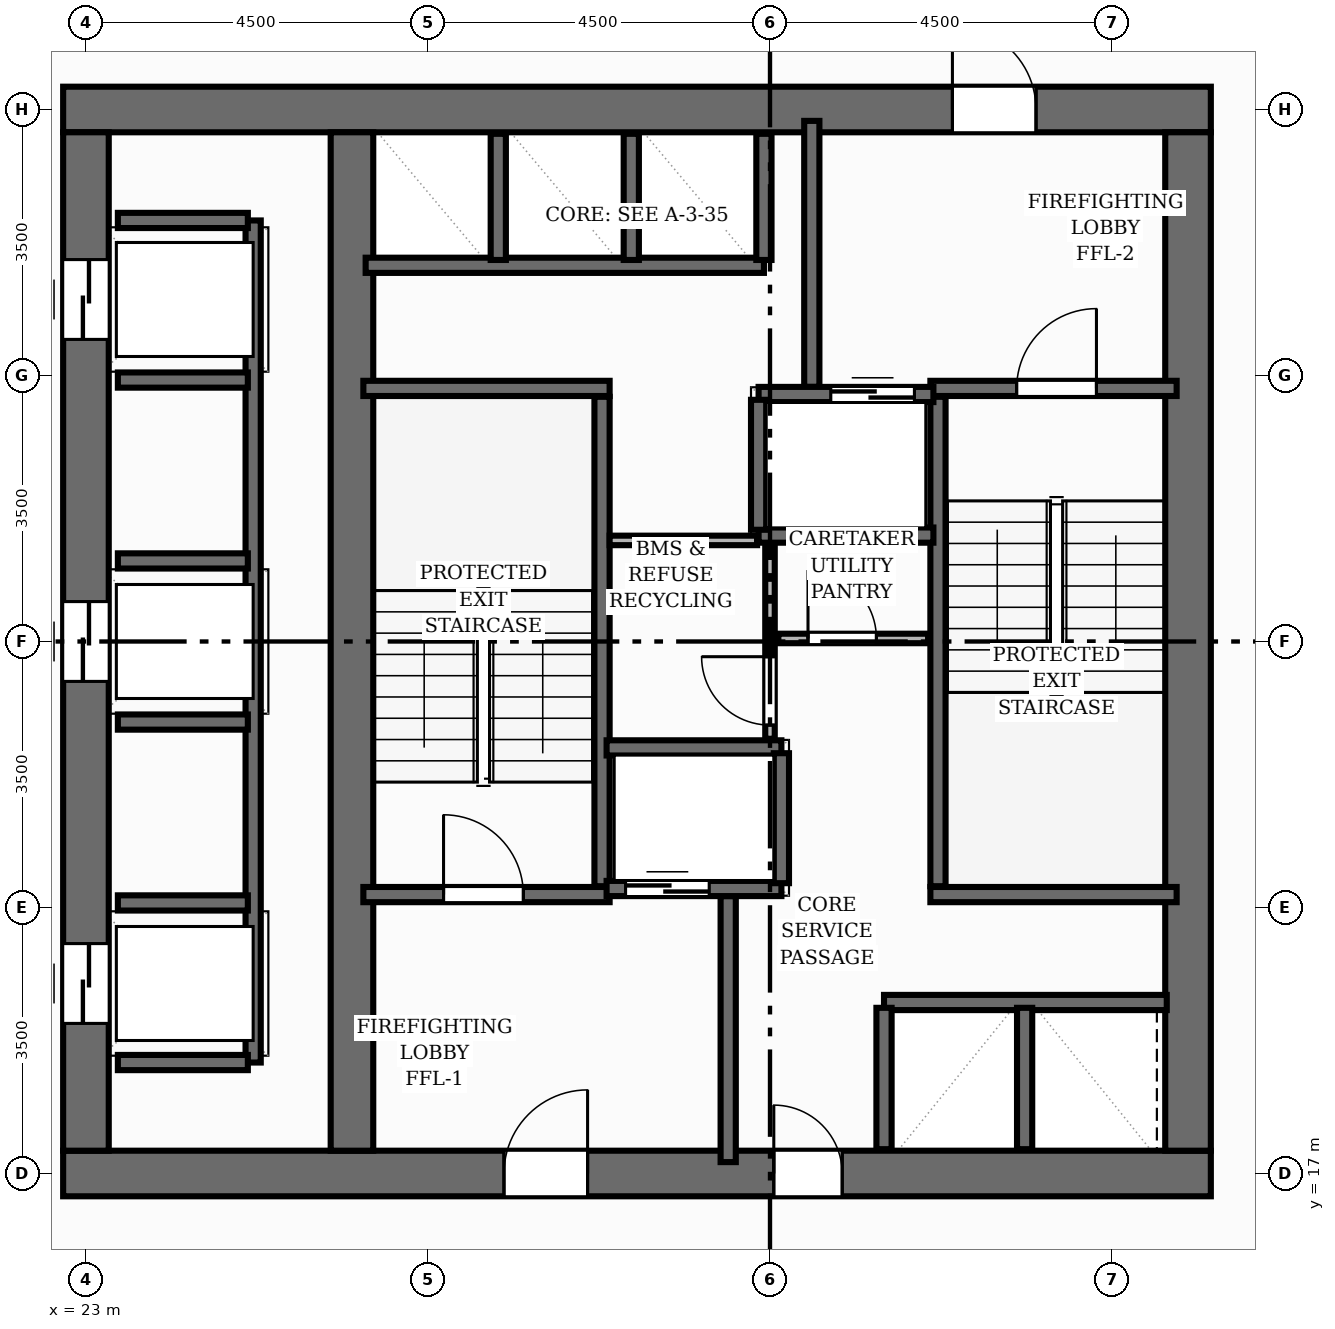
"""IFC4 building model, lengths in metres.
Left out: names, types, materials, properties, quantities, classifications, styles, units other than length and angle.
Written with IfcOpenShell. Run it as: python <this file> out.ifc"""

import sys

from ifc_helpers import new_model, si_unit, direction, frame, frame_2d, origin, place, context, subcontext, project, spatial, rectangle, extrude, element, fill, save


model = new_model("IFC4")
c1 = context("Model", 3, precision=1e-05, world=origin(), true_north=direction((0.0, 1.0)))
c2 = subcontext(c1, "Body", "Model", "MODEL_VIEW")
j1 = project(units=[si_unit("LENGTHUNIT", "METRE"), si_unit("PLANEANGLEUNIT", "RADIAN")], contexts=[c1])
p1 = place(None, origin())
s1 = spatial("IfcSite", under=j1, at=p1, CompositionType="ELEMENT")
p2 = place(p1, origin())
s2 = spatial("IfcBuilding", under=s1, at=p2, CompositionType="ELEMENT")
p3 = place(p2, frame((0.0, 0.0, 142.56)))
s3 = spatial("IfcBuildingStorey", under=s2, at=p3, CompositionType="ELEMENT", Elevation=142.56)
p4 = place(p3, frame((22.7, 17.0, 0.0), z_axis=(0.0, 0.0, 1.0), x_axis=(1.0, 0.0, 0.0)))
e1 = element("IfcWall", 1, at=p4, inside=s3, PredefinedType="SHEAR", context=c2, shape_type="SweptSolid", body=[
    extrude(rectangle(XDim=15.1, YDim=0.6, at=frame_2d((7.55, 0.0))), origin(), (0.0, 0.0, 1.0), 3.2),
])
p5 = place(p4, frame((5.8, 0.0, 0.0)))
e2 = element("IfcOpeningElement", 2, at=p5, cuts=e1, PredefinedType="OPENING", context=c2, shape_type="SweptSolid", body=[
    extrude(rectangle(XDim=1.1, YDim=2.15, at=frame_2d((0.55, 1.075))), frame((0.0, 0.31, 0.0), z_axis=(0.0, -1.0, 0.0), x_axis=(1.0, 0.0, 0.0)), (0.0, 0.0, 1.0), 0.62),
])
p6 = place(p4, frame((9.35, 0.0, 0.0)))
e3 = element("IfcOpeningElement", 3, at=p6, cuts=e1, PredefinedType="OPENING", context=c2, shape_type="SweptSolid", body=[
    extrude(rectangle(XDim=0.9, YDim=2.1, at=frame_2d((0.45, 1.05))), frame((0.0, 0.31, 0.0), z_axis=(0.0, -1.0, 0.0), x_axis=(1.0, 0.0, 0.0)), (0.0, 0.0, 1.0), 0.62),
])
p7 = place(p3, frame((22.7, 31.0, 0.0), z_axis=(0.0, 0.0, 1.0), x_axis=(1.0, 0.0, 0.0)))
e4 = element("IfcWall", 4, at=p7, inside=s3, PredefinedType="SHEAR", context=c2, shape_type="SweptSolid", body=[
    extrude(rectangle(XDim=15.1, YDim=0.6, at=frame_2d((7.55, 0.0))), origin(), (0.0, 0.0, 1.0), 3.2),
])
p8 = place(p7, frame((11.7, 0.0, 0.0)))
e5 = element("IfcOpeningElement", 5, at=p8, cuts=e4, PredefinedType="OPENING", context=c2, shape_type="SweptSolid", body=[
    extrude(rectangle(XDim=1.1, YDim=2.15, at=frame_2d((0.55, 1.075))), frame((0.0, 0.31, 0.0), z_axis=(0.0, -1.0, 0.0), x_axis=(1.0, 0.0, 0.0)), (0.0, 0.0, 1.0), 0.62),
])
p9 = place(p3, frame((23.0, 17.3, 0.0), z_axis=(0.0, 0.0, 1.0), x_axis=(0.0, 1.0, 0.0)))
e6 = element("IfcWall", 6, at=p9, inside=s3, PredefinedType="SHEAR", context=c2, shape_type="SweptSolid", body=[
    extrude(rectangle(XDim=13.4, YDim=0.6, at=frame_2d((6.7, 0.0))), origin(), (0.0, 0.0, 1.0), 3.2),
])
p10 = place(p9, frame((1.675, 0.0, 0.0)))
e7 = element("IfcOpeningElement", 7, at=p10, cuts=e6, PredefinedType="OPENING", context=c2, shape_type="SweptSolid", body=[
    extrude(rectangle(XDim=1.05, YDim=2.15, at=frame_2d((0.525, 1.075))), frame((0.0, 0.31, 0.0), z_axis=(0.0, -1.0, 0.0), x_axis=(1.0, 0.0, 0.0)), (0.0, 0.0, 1.0), 0.62),
])
p11 = place(p9, frame((6.175, 0.0, 0.0)))
e8 = element("IfcOpeningElement", 8, at=p11, cuts=e6, PredefinedType="OPENING", context=c2, shape_type="SweptSolid", body=[
    extrude(rectangle(XDim=1.05, YDim=2.15, at=frame_2d((0.525, 1.075))), frame((0.0, 0.31, 0.0), z_axis=(0.0, -1.0, 0.0), x_axis=(1.0, 0.0, 0.0)), (0.0, 0.0, 1.0), 0.62),
])
p12 = place(p9, frame((10.675, 0.0, 0.0)))
e9 = element("IfcOpeningElement", 9, at=p12, cuts=e6, PredefinedType="OPENING", context=c2, shape_type="SweptSolid", body=[
    extrude(rectangle(XDim=1.05, YDim=2.15, at=frame_2d((0.525, 1.075))), frame((0.0, 0.31, 0.0), z_axis=(0.0, -1.0, 0.0), x_axis=(1.0, 0.0, 0.0)), (0.0, 0.0, 1.0), 0.62),
])
p13 = place(p3, frame((37.5, 17.3, 0.0), z_axis=(0.0, 0.0, 1.0), x_axis=(0.0, 1.0, 0.0)))
e10 = element("IfcWall", 10, at=p13, inside=s3, PredefinedType="SHEAR", context=c2, shape_type="SweptSolid", body=[
    extrude(rectangle(XDim=13.4, YDim=0.6, at=frame_2d((6.7, 0.0))), origin(), (0.0, 0.0, 1.0), 3.2),
])
p14 = place(p3, frame((26.5, 17.3, 0.0), z_axis=(0.0, 0.0, 1.0), x_axis=(0.0, 1.0, 0.0)))
e11 = element("IfcWall", 11, at=p14, inside=s3, PredefinedType="SHEAR", context=c2, shape_type="SweptSolid", body=[
    extrude(rectangle(XDim=13.4, YDim=0.56, at=frame_2d((6.7, 0.0))), origin(), (0.0, 0.0, 1.0), 3.2),
])
p15 = place(p3, frame((29.79, 20.78, 0.0), z_axis=(0.0, 0.0, 1.0), x_axis=(0.0, 1.0, 0.0)))
e12 = element("IfcWall", 12, at=p15, inside=s3, PredefinedType="SHEAR", context=c2, shape_type="SweptSolid", body=[
    extrude(rectangle(XDim=6.44, YDim=0.2, at=frame_2d((3.22, 0.0))), origin(), (0.0, 0.0, 1.0), 3.2),
])
p16 = place(p3, frame((26.65, 27.33, 0.0), z_axis=(0.0, 0.0, 1.0), x_axis=(1.0, 0.0, 0.0)))
e13 = element("IfcWall", 13, at=p16, inside=s3, PredefinedType="SHEAR", context=c2, shape_type="SweptSolid", body=[
    extrude(rectangle(XDim=3.24, YDim=0.2, at=frame_2d((1.62, 0.0))), origin(), (0.0, 0.0, 1.0), 3.2),
])
p17 = place(p3, frame((26.65, 20.67, 0.0), z_axis=(0.0, 0.0, 1.0), x_axis=(1.0, 0.0, 0.0)))
e14 = element("IfcWall", 14, at=p17, inside=s3, PredefinedType="SHEAR", context=c2, shape_type="SweptSolid", body=[
    extrude(rectangle(XDim=3.24, YDim=0.2, at=frame_2d((1.62, 0.0))), origin(), (0.0, 0.0, 1.0), 3.2),
])
p18 = place(p17, frame((1.055, 0.0, 0.0)))
e15 = element("IfcOpeningElement", 15, at=p18, cuts=e14, PredefinedType="OPENING", context=c2, shape_type="SweptSolid", body=[
    extrude(rectangle(XDim=1.05, YDim=2.15, at=frame_2d((0.525, 1.075))), frame((0.0, 0.11, 0.0), z_axis=(0.0, -1.0, 0.0), x_axis=(1.0, 0.0, 0.0)), (0.0, 0.0, 1.0), 0.22),
])
p19 = place(p3, frame((34.21, 20.78, 0.0), z_axis=(0.0, 0.0, 1.0), x_axis=(0.0, 1.0, 0.0)))
e16 = element("IfcWall", 16, at=p19, inside=s3, PredefinedType="SHEAR", context=c2, shape_type="SweptSolid", body=[
    extrude(rectangle(XDim=6.44, YDim=0.2, at=frame_2d((3.22, 0.0))), origin(), (0.0, 0.0, 1.0), 3.2),
])
p20 = place(p3, frame((34.11, 20.67, 0.0), z_axis=(0.0, 0.0, 1.0), x_axis=(1.0, 0.0, 0.0)))
e17 = element("IfcWall", 17, at=p20, inside=s3, PredefinedType="SHEAR", context=c2, shape_type="SweptSolid", body=[
    extrude(rectangle(XDim=3.24, YDim=0.2, at=frame_2d((1.62, 0.0))), origin(), (0.0, 0.0, 1.0), 3.2),
])
p21 = place(p3, frame((34.11, 27.33, 0.0), z_axis=(0.0, 0.0, 1.0), x_axis=(1.0, 0.0, 0.0)))
e18 = element("IfcWall", 18, at=p21, inside=s3, PredefinedType="SHEAR", context=c2, shape_type="SweptSolid", body=[
    extrude(rectangle(XDim=3.24, YDim=0.2, at=frame_2d((1.62, 0.0))), origin(), (0.0, 0.0, 1.0), 3.2),
])
p22 = place(p21, frame((1.135, 0.0, 0.0)))
e19 = element("IfcOpeningElement", 19, at=p22, cuts=e18, PredefinedType="OPENING", context=c2, shape_type="SweptSolid", body=[
    extrude(rectangle(XDim=1.05, YDim=2.15, at=frame_2d((0.525, 1.075))), frame((0.0, 0.11, 0.0), z_axis=(0.0, -1.0, 0.0), x_axis=(1.0, 0.0, 0.0)), (0.0, 0.0, 1.0), 0.22),
])
for number, where, z_axis, x_axis in (
    (20, (31.45, 17.15, 0.0), (0.0, 0.0, 1.0), (0.0, 1.0, 0.0)),
    (21, (32.55, 27.35, 0.0), (0.0, 0.0, 1.0), (0.0, 1.0, 0.0)),
):
    element("IfcWall", number, at=place(p3, frame(where, z_axis=z_axis, x_axis=x_axis)), inside=s3, PredefinedType="SHEAR", context=c2, shape_type="SweptSolid", body=[
        extrude(rectangle(XDim=3.5, YDim=0.2, at=frame_2d((1.75, 0.0))), origin(), (0.0, 0.0, 1.0), 3.2),
    ])
p23 = place(p3, frame((29.85, 20.75, 0.0), z_axis=(0.0, 0.0, 1.0), x_axis=(1.0, 0.0, 0.0)))
e22 = element("IfcWall", 22, at=p23, inside=s3, PredefinedType="SHEAR", context=c2, shape_type="SweptSolid", body=[
    extrude(rectangle(XDim=2.3, YDim=0.2, at=frame_2d((1.15, 0.0))), origin(), (0.0, 0.0, 1.0), 3.2),
])
p24 = place(p23, frame((0.25, 0.0, 0.0)))
e23 = element("IfcOpeningElement", 23, at=p24, cuts=e22, PredefinedType="OPENING", context=c2, shape_type="SweptSolid", body=[
    extrude(rectangle(XDim=1.1, YDim=2.15, at=frame_2d((0.55, 1.075))), frame((0.0, 0.11, 0.0), z_axis=(0.0, -1.0, 0.0), x_axis=(1.0, 0.0, 0.0)), (0.0, 0.0, 1.0), 0.22),
])
p25 = place(p3, frame((29.85, 22.6, 0.0), z_axis=(0.0, 0.0, 1.0), x_axis=(1.0, 0.0, 0.0)))
e24 = element("IfcWall", 24, at=p25, inside=s3, PredefinedType="SHEAR", context=c2, shape_type="SweptSolid", body=[
    extrude(rectangle(XDim=2.3, YDim=0.2, at=frame_2d((1.15, 0.0))), origin(), (0.0, 0.0, 1.0), 3.2),
])
p26 = place(p3, frame((32.15, 20.82, 0.0), z_axis=(0.0, 0.0, 1.0), x_axis=(0.0, 1.0, 0.0)))
e25 = element("IfcWall", 25, at=p26, inside=s3, PredefinedType="SHEAR", context=c2, shape_type="SweptSolid", body=[
    extrude(rectangle(XDim=1.71, YDim=0.2, at=frame_2d((0.855, 0.0))), origin(), (0.0, 0.0, 1.0), 3.2),
])
p27 = place(p3, frame((31.85, 27.25, 0.0), z_axis=(0.0, 0.0, 1.0), x_axis=(1.0, 0.0, 0.0)))
e26 = element("IfcWall", 26, at=p27, inside=s3, PredefinedType="SHEAR", context=c2, shape_type="SweptSolid", body=[
    extrude(rectangle(XDim=2.3, YDim=0.2, at=frame_2d((1.15, 0.0))), origin(), (0.0, 0.0, 1.0), 3.2),
])
p28 = place(p27, frame((0.95, 0.0, 0.0)))
e27 = element("IfcOpeningElement", 27, at=p28, cuts=e26, PredefinedType="OPENING", context=c2, shape_type="SweptSolid", body=[
    extrude(rectangle(XDim=1.1, YDim=2.15, at=frame_2d((0.55, 1.075))), frame((0.0, 0.11, 0.0), z_axis=(0.0, -1.0, 0.0), x_axis=(1.0, 0.0, 0.0)), (0.0, 0.0, 1.0), 0.22),
])
p29 = place(p3, frame((31.85, 25.4, 0.0), z_axis=(0.0, 0.0, 1.0), x_axis=(1.0, 0.0, 0.0)))
e28 = element("IfcWall", 28, at=p29, inside=s3, PredefinedType="SHEAR", context=c2, shape_type="SweptSolid", body=[
    extrude(rectangle(XDim=2.3, YDim=0.2, at=frame_2d((1.15, 0.0))), origin(), (0.0, 0.0, 1.0), 3.2),
])
p30 = place(p3, frame((31.85, 25.47, 0.0), z_axis=(0.0, 0.0, 1.0), x_axis=(0.0, 1.0, 0.0)))
e29 = element("IfcWall", 29, at=p30, inside=s3, PredefinedType="SHEAR", context=c2, shape_type="SweptSolid", body=[
    extrude(rectangle(XDim=1.71, YDim=0.2, at=frame_2d((0.855, 0.0))), origin(), (0.0, 0.0, 1.0), 3.2),
])
p31 = place(p3, frame((25.2, 18.46, 0.0), z_axis=(0.0, 0.0, 1.0), x_axis=(0.0, 1.0, 0.0)))
e30 = element("IfcWall", 30, at=p31, inside=s3, PredefinedType="SHEAR", context=c2, shape_type="SweptSolid", body=[
    extrude(rectangle(XDim=11.08, YDim=0.2, at=frame_2d((5.54, 0.0))), origin(), (0.0, 0.0, 1.0), 3.2),
])
for number, where, z_axis, x_axis in (
    (31, (23.42, 18.46, 0.0), (0.0, 0.0, 1.0), (1.0, 0.0, 0.0)),
    (32, (23.42, 29.54, 0.0), (0.0, 0.0, 1.0), (1.0, 0.0, 0.0)),
    (33, (23.42, 20.56, 0.0), (0.0, 0.0, 1.0), (1.0, 0.0, 0.0)),
    (34, (23.42, 22.94, 0.0), (0.0, 0.0, 1.0), (1.0, 0.0, 0.0)),
    (35, (23.42, 25.06, 0.0), (0.0, 0.0, 1.0), (1.0, 0.0, 0.0)),
    (36, (23.42, 27.44, 0.0), (0.0, 0.0, 1.0), (1.0, 0.0, 0.0)),
):
    element("IfcWall", number, at=place(p3, frame(where, z_axis=z_axis, x_axis=x_axis)), inside=s3, PredefinedType="SHEAR", context=c2, shape_type="SweptSolid", body=[
        extrude(rectangle(XDim=1.71, YDim=0.2, at=frame_2d((0.855, 0.0))), origin(), (0.0, 0.0, 1.0), 3.2),
    ])
p32 = place(p3, frame((26.68, 28.95, 0.0), z_axis=(0.0, 0.0, 1.0), x_axis=(1.0, 0.0, 0.0)))
e37 = element("IfcWall", 37, at=p32, inside=s3, PredefinedType="SHEAR", context=c2, shape_type="SweptSolid", body=[
    extrude(rectangle(XDim=5.24, YDim=0.2, at=frame_2d((2.62, 0.0))), origin(), (0.0, 0.0, 1.0), 3.2),
])
for number, where, z_axis, x_axis in (
    (38, (31.92, 29.02, 0.0), (0.0, 0.0, 1.0), (0.0, 1.0, 0.0)),
    (39, (28.425, 29.02, 0.0), (0.0, 0.0, 1.0), (0.0, 1.0, 0.0)),
    (40, (30.175, 29.02, 0.0), (0.0, 0.0, 1.0), (0.0, 1.0, 0.0)),
):
    element("IfcWall", number, at=place(p3, frame(where, z_axis=z_axis, x_axis=x_axis)), inside=s3, PredefinedType="SHEAR", context=c2, shape_type="SweptSolid", body=[
        extrude(rectangle(XDim=1.66, YDim=0.2, at=frame_2d((0.83, 0.0))), origin(), (0.0, 0.0, 1.0), 3.2),
    ])
p33 = place(p3, frame((33.5, 19.25, 0.0), z_axis=(0.0, 0.0, 1.0), x_axis=(1.0, 0.0, 0.0)))
e41 = element("IfcWall", 41, at=p33, inside=s3, PredefinedType="SHEAR", context=c2, shape_type="SweptSolid", body=[
    extrude(rectangle(XDim=3.72, YDim=0.2, at=frame_2d((1.86, 0.0))), origin(), (0.0, 0.0, 1.0), 3.2),
])
for number, where, z_axis, x_axis in (
    (42, (33.5, 17.32, 0.0), (0.0, 0.0, 1.0), (0.0, 1.0, 0.0)),
    (43, (35.35, 17.32, 0.0), (0.0, 0.0, 1.0), (0.0, 1.0, 0.0)),
):
    element("IfcWall", number, at=place(p3, frame(where, z_axis=z_axis, x_axis=x_axis)), inside=s3, PredefinedType="SHEAR", context=c2, shape_type="SweptSolid", body=[
        extrude(rectangle(XDim=1.86, YDim=0.2, at=frame_2d((0.93, 0.0))), origin(), (0.0, 0.0, 1.0), 3.2),
    ])
p34 = place(p3, frame((32.0, 22.72, 0.0), z_axis=(0.0, 0.0, 1.0), x_axis=(0.0, 1.0, 0.0)))
e44 = element("IfcWall", 44, at=p34, inside=s3, PredefinedType="PARTITIONING", context=c2, shape_type="SweptSolid", body=[
    extrude(rectangle(XDim=2.52, YDim=0.125, at=frame_2d((1.26, 0.0))), origin(), (0.0, 0.0, 1.0), 2.955),
])
p35 = place(p34, frame((0.18, 0.0, 0.0)))
e45 = element("IfcOpeningElement", 45, at=p35, cuts=e44, PredefinedType="OPENING", context=c2, shape_type="SweptSolid", body=[
    extrude(rectangle(XDim=0.9, YDim=2.1, at=frame_2d((0.45, 1.05))), frame((0.0, 0.073, 0.0), z_axis=(0.0, -1.0, 0.0), x_axis=(1.0, 0.0, 0.0)), (0.0, 0.0, 1.0), 0.145),
])
p36 = place(p3, frame((32.11, 24.04, 0.0), z_axis=(0.0, 0.0, 1.0), x_axis=(1.0, 0.0, 0.0)))
e46 = element("IfcWall", 46, at=p36, inside=s3, PredefinedType="PARTITIONING", context=c2, shape_type="SweptSolid", body=[
    extrude(rectangle(XDim=1.97, YDim=0.125, at=frame_2d((0.985, 0.0))), origin(), (0.0, 0.0, 1.0), 2.955),
])
p37 = place(p36, frame((0.39, 0.0, 0.0)))
e47 = element("IfcOpeningElement", 47, at=p37, cuts=e46, PredefinedType="OPENING", context=c2, shape_type="SweptSolid", body=[
    extrude(rectangle(XDim=0.9, YDim=2.1, at=frame_2d((0.45, 1.05))), frame((0.0, 0.073, 0.0), z_axis=(0.0, -1.0, 0.0), x_axis=(1.0, 0.0, 0.0)), (0.0, 0.0, 1.0), 0.145),
])
p38 = place(p3, frame((29.89, 25.33, 0.0), z_axis=(0.0, 0.0, 1.0), x_axis=(1.0, 0.0, 0.0)))
e48 = element("IfcWall", 48, at=p38, inside=s3, PredefinedType="PARTITIONING", context=c2, shape_type="SweptSolid", body=[
    extrude(rectangle(XDim=1.94, YDim=0.125, at=frame_2d((0.97, 0.0))), origin(), (0.0, 0.0, 1.0), 2.955),
])
p39 = place(p3, frame((43.184, 17.96, 0.0), z_axis=(0.0, 0.0, 1.0), x_axis=(-0.790862802872, -0.611993486104, 0.0)))
e49 = element("IfcWall", 49, at=p39, inside=s3, PredefinedType="PARTITIONING", context=c2, shape_type="SweptSolid", body=[
    extrude(rectangle(XDim=9.975, YDim=0.125, at=frame_2d((4.987, 0.0))), origin(), (0.0, 0.0, 1.0), 2.411),
])
p40 = place(p39, frame((3.417, 0.0, 0.0)))
e50 = element("IfcOpeningElement", 50, at=p40, cuts=e49, PredefinedType="OPENING", context=c2, shape_type="SweptSolid", body=[
    extrude(rectangle(XDim=0.9, YDim=2.1, at=frame_2d((0.45, 1.05))), frame((0.0, 0.073, 0.0), z_axis=(0.0, -1.0, 0.0), x_axis=(1.0, 0.0, 0.0)), (0.0, 0.0, 1.0), 0.145),
])
p41 = place(p18, origin())
e51 = element("IfcDoor", 51, at=p41, inside=s3, OperationType="SINGLE_SWING_LEFT", PredefinedType="DOOR", context=c2, shape_type="SweptSolid", body=[
    extrude(rectangle(XDim=1.05, YDim=2.15, at=frame_2d((0.525, 1.075))), frame((0.0, 0.025, 0.0), z_axis=(0.0, -1.0, 0.0), x_axis=(1.0, 0.0, 0.0)), (0.0, 0.0, 1.0), 0.05),
])
fill(e15, e51)
p42 = place(p22, origin())
e52 = element("IfcDoor", 52, at=p42, inside=s3, OperationType="SINGLE_SWING_RIGHT", PredefinedType="DOOR", context=c2, shape_type="SweptSolid", body=[
    extrude(rectangle(XDim=1.05, YDim=2.15, at=frame_2d((0.525, 1.075))), frame((0.0, 0.025, 0.0), z_axis=(0.0, -1.0, 0.0), x_axis=(1.0, 0.0, 0.0)), (0.0, 0.0, 1.0), 0.05),
])
fill(e19, e52)
p43 = place(p5, origin())
e53 = element("IfcDoor", 53, at=p43, inside=s3, OperationType="SINGLE_SWING_RIGHT", PredefinedType="DOOR", context=c2, shape_type="SweptSolid", body=[
    extrude(rectangle(XDim=1.1, YDim=2.15, at=frame_2d((0.55, 1.075))), frame((0.0, 0.025, 0.0), z_axis=(0.0, -1.0, 0.0), x_axis=(1.0, 0.0, 0.0)), (0.0, 0.0, 1.0), 0.05),
])
fill(e2, e53)
p44 = place(p8, origin())
e54 = element("IfcDoor", 54, at=p44, inside=s3, OperationType="SINGLE_SWING_LEFT", PredefinedType="DOOR", context=c2, shape_type="SweptSolid", body=[
    extrude(rectangle(XDim=1.1, YDim=2.15, at=frame_2d((0.55, 1.075))), frame((0.0, 0.025, 0.0), z_axis=(0.0, -1.0, 0.0), x_axis=(1.0, 0.0, 0.0)), (0.0, 0.0, 1.0), 0.05),
])
fill(e5, e54)
p45 = place(p24, origin())
e55 = element("IfcDoor", 55, at=p45, inside=s3, OperationType="DOUBLE_DOOR_SLIDING", PredefinedType="DOOR", context=c2, shape_type="SweptSolid", body=[
    extrude(rectangle(XDim=1.1, YDim=2.15, at=frame_2d((0.55, 1.075))), frame((0.0, 0.025, 0.0), z_axis=(0.0, -1.0, 0.0), x_axis=(1.0, 0.0, 0.0)), (0.0, 0.0, 1.0), 0.05),
])
fill(e23, e55)
p46 = place(p28, origin())
e56 = element("IfcDoor", 56, at=p46, inside=s3, OperationType="DOUBLE_DOOR_SLIDING", PredefinedType="DOOR", context=c2, shape_type="SweptSolid", body=[
    extrude(rectangle(XDim=1.1, YDim=2.15, at=frame_2d((0.55, 1.075))), frame((0.0, 0.025, 0.0), z_axis=(0.0, -1.0, 0.0), x_axis=(1.0, 0.0, 0.0)), (0.0, 0.0, 1.0), 0.05),
])
fill(e27, e56)
p47 = place(p10, origin())
e57 = element("IfcDoor", 57, at=p47, inside=s3, OperationType="DOUBLE_DOOR_SLIDING", PredefinedType="DOOR", context=c2, shape_type="SweptSolid", body=[
    extrude(rectangle(XDim=1.05, YDim=2.15, at=frame_2d((0.525, 1.075))), frame((0.0, 0.025, 0.0), z_axis=(0.0, -1.0, 0.0), x_axis=(1.0, 0.0, 0.0)), (0.0, 0.0, 1.0), 0.05),
])
fill(e7, e57)
p48 = place(p11, origin())
e58 = element("IfcDoor", 58, at=p48, inside=s3, OperationType="DOUBLE_DOOR_SLIDING", PredefinedType="DOOR", context=c2, shape_type="SweptSolid", body=[
    extrude(rectangle(XDim=1.05, YDim=2.15, at=frame_2d((0.525, 1.075))), frame((0.0, 0.025, 0.0), z_axis=(0.0, -1.0, 0.0), x_axis=(1.0, 0.0, 0.0)), (0.0, 0.0, 1.0), 0.05),
])
fill(e8, e58)
p49 = place(p12, origin())
e59 = element("IfcDoor", 59, at=p49, inside=s3, OperationType="DOUBLE_DOOR_SLIDING", PredefinedType="DOOR", context=c2, shape_type="SweptSolid", body=[
    extrude(rectangle(XDim=1.05, YDim=2.15, at=frame_2d((0.525, 1.075))), frame((0.0, 0.025, 0.0), z_axis=(0.0, -1.0, 0.0), x_axis=(1.0, 0.0, 0.0)), (0.0, 0.0, 1.0), 0.05),
])
fill(e9, e59)
p50 = place(p6, origin())
e60 = element("IfcDoor", 60, at=p50, inside=s3, OperationType="SINGLE_SWING_LEFT", PredefinedType="DOOR", context=c2, shape_type="SweptSolid", body=[
    extrude(rectangle(XDim=0.9, YDim=2.1, at=frame_2d((0.45, 1.05))), frame((0.0, 0.025, 0.0), z_axis=(0.0, -1.0, 0.0), x_axis=(1.0, 0.0, 0.0)), (0.0, 0.0, 1.0), 0.05),
])
fill(e3, e60)
p51 = place(p37, origin())
e61 = element("IfcDoor", 61, at=p51, inside=s3, OperationType="SINGLE_SWING_LEFT", PredefinedType="DOOR", context=c2, shape_type="SweptSolid", body=[
    extrude(rectangle(XDim=0.9, YDim=2.1, at=frame_2d((0.45, 1.05))), frame((0.0, 0.025, 0.0), z_axis=(0.0, -1.0, 0.0), x_axis=(1.0, 0.0, 0.0)), (0.0, 0.0, 1.0), 0.05),
])
fill(e47, e61)
p52 = place(p35, origin())
e62 = element("IfcDoor", 62, at=p52, inside=s3, OperationType="SINGLE_SWING_RIGHT", PredefinedType="DOOR", context=c2, shape_type="SweptSolid", body=[
    extrude(rectangle(XDim=0.9, YDim=2.1, at=frame_2d((0.45, 1.05))), frame((0.0, 0.025, 0.0), z_axis=(0.0, -1.0, 0.0), x_axis=(1.0, 0.0, 0.0)), (0.0, 0.0, 1.0), 0.05),
])
fill(e45, e62)
save(model, sys.argv[1])
